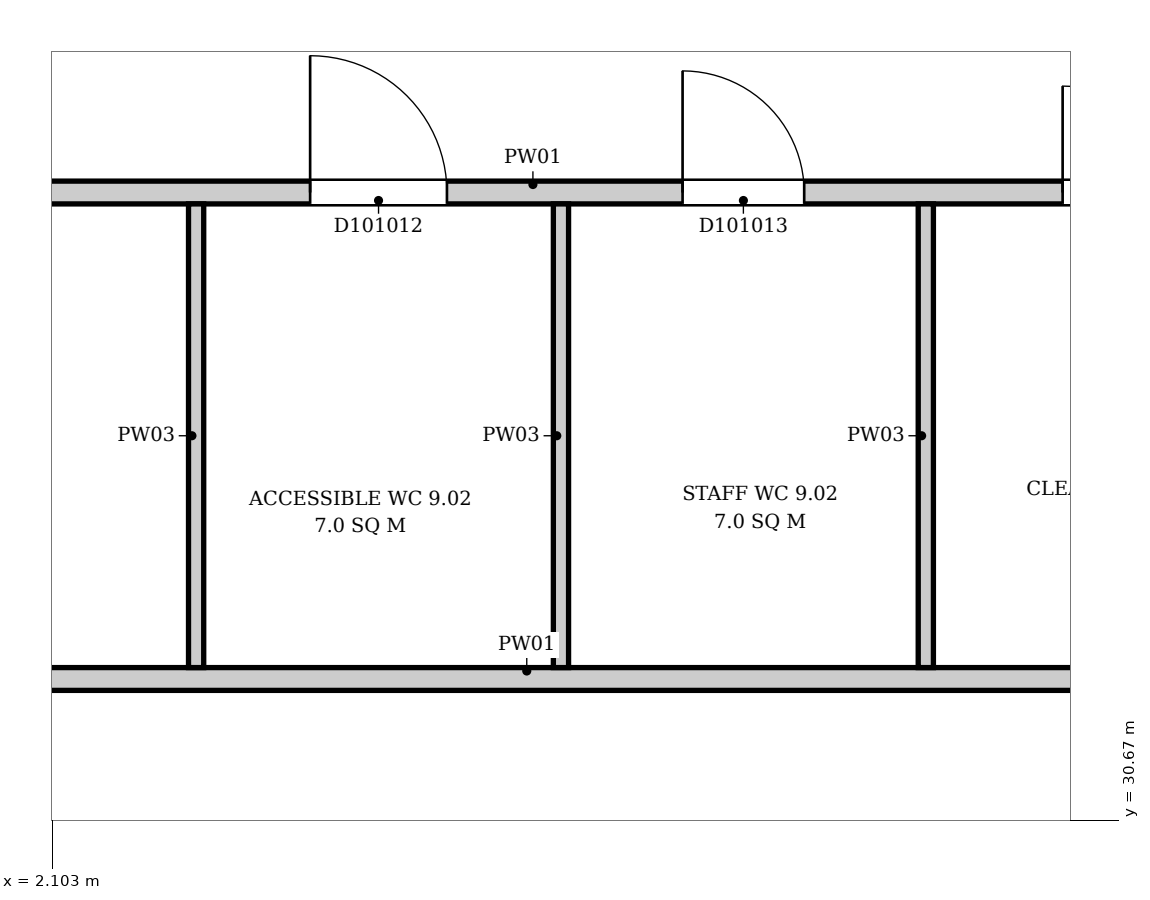
"""IFC4 building model, lengths in metres.
Left out: names, types, materials, properties, quantities, classifications, styles, units other than length and angle.
Written with IfcOpenShell. Run it as: python <this file> out.ifc"""

import sys

from ifc_helpers import new_model, si_unit, direction, frame, frame_2d, origin, place, context, subcontext, project, spatial, rectangle, extrude, element, fill, save


model = new_model("IFC4")
c1 = context("Model", 3, precision=1e-05, world=origin(), true_north=direction((0.0, 1.0)))
c2 = subcontext(c1, "Body", "Model", "MODEL_VIEW")
j1 = project(units=[si_unit("LENGTHUNIT", "METRE"), si_unit("PLANEANGLEUNIT", "RADIAN")], contexts=[c1])
p1 = place(None, origin())
s1 = spatial("IfcSite", under=j1, at=p1, CompositionType="ELEMENT")
p2 = place(p1, origin())
s2 = spatial("IfcBuilding", under=s1, at=p2, CompositionType="ELEMENT")
p3 = place(p2, frame((0.0, 0.0, 48.7)))
s3 = spatial("IfcBuildingStorey", under=s2, at=p3, CompositionType="ELEMENT", Elevation=48.7)
p4 = place(p3, frame((0.056, 31.6, 0.0), z_axis=(0.0, 0.0, 1.0), x_axis=(1.0, 0.0, 0.0)))
e1 = element("IfcWall", 1, at=p4, inside=s3, PredefinedType="PARTITIONING", context=c2, shape_type="SweptSolid", body=[
    extrude(rectangle(XDim=10.338, YDim=0.15, at=frame_2d((5.169, 0.0))), origin(), (0.0, 0.0, 1.0), 3.9),
])
p5 = place(p3, frame((0.056, 34.8, 0.0), z_axis=(0.0, 0.0, 1.0), x_axis=(1.0, 0.0, 0.0)))
e2 = element("IfcWall", 2, at=p5, inside=s3, PredefinedType="PARTITIONING", context=c2, shape_type="SweptSolid", body=[
    extrude(rectangle(XDim=10.419, YDim=0.15, at=frame_2d((5.209, 0.0))), origin(), (0.0, 0.0, 1.0), 3.9),
])
p6 = place(p5, frame((1.094, 0.0, 0.0)))
e3 = element("IfcOpeningElement", 3, at=p6, cuts=e2, PredefinedType="OPENING", context=c2, shape_type="SweptSolid", body=[
    extrude(rectangle(XDim=0.8, YDim=2.1, at=frame_2d((0.4, 1.05))), frame((0.0, 0.085, 0.0), z_axis=(0.0, -1.0, 0.0), x_axis=(1.0, 0.0, 0.0)), (0.0, 0.0, 1.0), 0.17),
])
p7 = place(p5, frame((3.744, 0.0, 0.0)))
e4 = element("IfcOpeningElement", 4, at=p7, cuts=e2, PredefinedType="OPENING", context=c2, shape_type="SweptSolid", body=[
    extrude(rectangle(XDim=0.9, YDim=2.1, at=frame_2d((0.45, 1.05))), frame((0.0, 0.085, 0.0), z_axis=(0.0, -1.0, 0.0), x_axis=(1.0, 0.0, 0.0)), (0.0, 0.0, 1.0), 0.17),
])
p8 = place(p5, frame((6.194, 0.0, 0.0)))
e5 = element("IfcOpeningElement", 5, at=p8, cuts=e2, PredefinedType="OPENING", context=c2, shape_type="SweptSolid", body=[
    extrude(rectangle(XDim=0.8, YDim=2.1, at=frame_2d((0.4, 1.05))), frame((0.0, 0.085, 0.0), z_axis=(0.0, -1.0, 0.0), x_axis=(1.0, 0.0, 0.0)), (0.0, 0.0, 1.0), 0.17),
])
p9 = place(p5, frame((8.694, 0.0, 0.0)))
e6 = element("IfcOpeningElement", 6, at=p9, cuts=e2, PredefinedType="OPENING", context=c2, shape_type="SweptSolid", body=[
    extrude(rectangle(XDim=0.7, YDim=2.1, at=frame_2d((0.35, 1.05))), frame((0.0, 0.085, 0.0), z_axis=(0.0, -1.0, 0.0), x_axis=(1.0, 0.0, 0.0)), (0.0, 0.0, 1.0), 0.17),
])
for number, where, z_axis, x_axis in (
    (7, (3.05, 31.675, 0.0), (0.0, 0.0, 1.0), (0.0, 1.0, 0.0)),
    (8, (5.45, 31.675, 0.0), (0.0, 0.0, 1.0), (0.0, 1.0, 0.0)),
    (9, (7.85, 31.675, 0.0), (0.0, 0.0, 1.0), (0.0, 1.0, 0.0)),
):
    element("IfcWall", number, at=place(p3, frame(where, z_axis=z_axis, x_axis=x_axis)), inside=s3, PredefinedType="PARTITIONING", context=c2, shape_type="SweptSolid", body=[
        extrude(rectangle(XDim=3.05, YDim=0.1, at=frame_2d((1.525, 0.0))), origin(), (0.0, 0.0, 1.0), 3.9),
    ])
p10 = place(p7, origin())
e10 = element("IfcDoor", 10, at=p10, inside=s3, OperationType="SINGLE_SWING_LEFT", PredefinedType="DOOR", context=c2, shape_type="SweptSolid", body=[
    extrude(rectangle(XDim=0.9, YDim=2.1, at=frame_2d((0.45, 1.05))), frame((0.0, 0.025, 0.0), z_axis=(0.0, -1.0, 0.0), x_axis=(1.0, 0.0, 0.0)), (0.0, 0.0, 1.0), 0.05),
])
fill(e4, e10)
p11 = place(p8, origin())
e11 = element("IfcDoor", 11, at=p11, inside=s3, OperationType="SINGLE_SWING_RIGHT", PredefinedType="DOOR", context=c2, shape_type="SweptSolid", body=[
    extrude(rectangle(XDim=0.8, YDim=2.1, at=frame_2d((0.4, 1.05))), frame((0.0, 0.025, 0.0), z_axis=(0.0, -1.0, 0.0), x_axis=(1.0, 0.0, 0.0)), (0.0, 0.0, 1.0), 0.05),
])
fill(e5, e11)
p12 = place(p9, origin())
e12 = element("IfcDoor", 12, at=p12, inside=s3, OperationType="SINGLE_SWING_LEFT", PredefinedType="DOOR", context=c2, shape_type="SweptSolid", body=[
    extrude(rectangle(XDim=0.7, YDim=2.1, at=frame_2d((0.35, 1.05))), frame((0.0, 0.025, 0.0), z_axis=(0.0, -1.0, 0.0), x_axis=(1.0, 0.0, 0.0)), (0.0, 0.0, 1.0), 0.05),
])
fill(e6, e12)
save(model, sys.argv[1])
